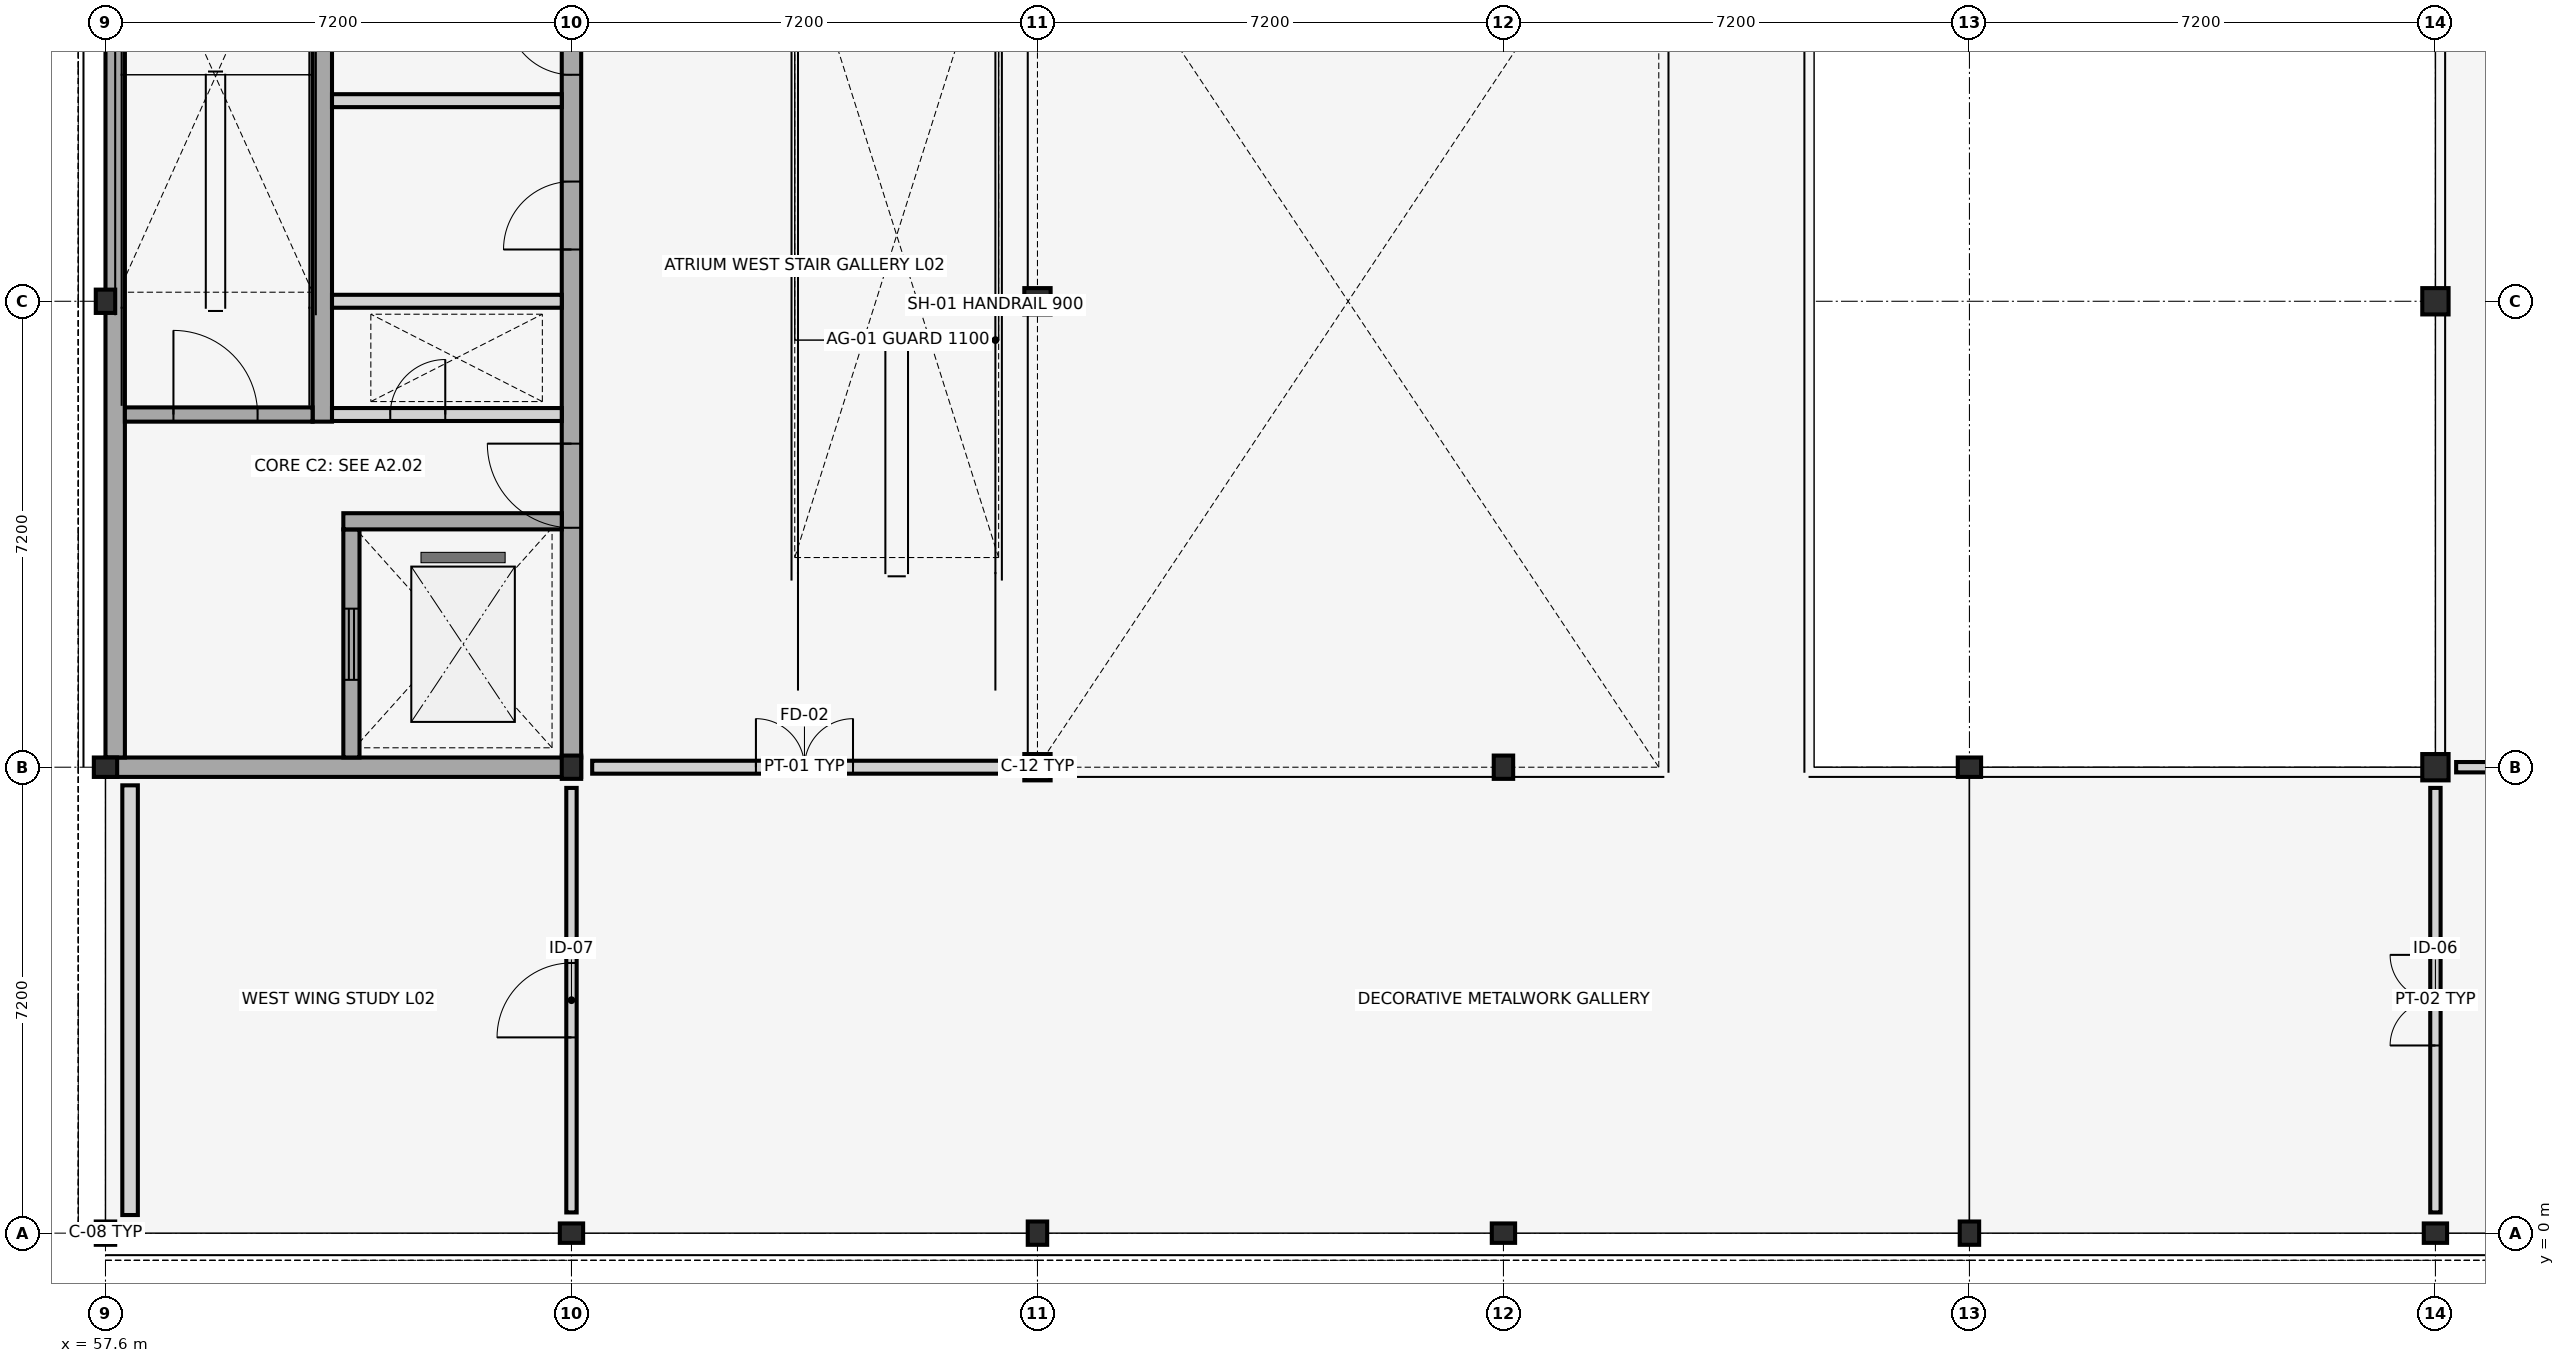
"""IFC4 building model, lengths in metres.
Left out: names, types, materials, properties, quantities, classifications, styles, units other than length and angle.
Written with IfcOpenShell. Run it as: python <this file> out.ifc"""

import sys

from ifc_helpers import new_model, si_unit, direction, frame, frame_2d, origin, origin_2d, place, context, subcontext, project, spatial, rectangle, hollow_circle, i_section, extrude, element, fill, save


model = new_model("IFC4")
c1 = context("Model", 3, precision=1e-05, world=origin(), true_north=direction((0.0, 1.0)))
c2 = subcontext(c1, "Body", "Model", "MODEL_VIEW")
j1 = project(units=[si_unit("LENGTHUNIT", "METRE"), si_unit("PLANEANGLEUNIT", "RADIAN")], contexts=[c1])
p1 = place(None, origin())
s1 = spatial("IfcSite", under=j1, at=p1, CompositionType="ELEMENT")
p2 = place(p1, origin())
s2 = spatial("IfcBuilding", under=s1, at=p2, CompositionType="ELEMENT")
p3 = place(p2, frame((0.0, 0.0, 8.7)))
s3 = spatial("IfcBuildingStorey", under=s2, at=p3, CompositionType="ELEMENT", Elevation=8.7)
for number, where, z_axis, x_axis in (
    (1, (57.6, 0.0, 0.0), (0.0, 0.0, 1.0), (1.0, 0.0, 0.0)),
    (2, (57.6, 7.2, 0.0), (0.0, 0.0, 1.0), (0.0, 1.0, 0.0)),
    (3, (57.6, 14.4, 0.0), (0.0, 0.0, 1.0), (1.0, 0.0, 0.0)),
    (4, (64.8, 0.0, 0.0), (0.0, 0.0, 1.0), (0.0, 1.0, 0.0)),
    (5, (64.8, 7.2, 0.0), (0.0, 0.0, 1.0), (1.0, 0.0, 0.0)),
    (6, (72.0, 0.0, 0.0), (0.0, 0.0, 1.0), (1.0, 0.0, 0.0)),
):
    element("IfcColumn", number, at=place(p3, frame(where, z_axis=z_axis, x_axis=x_axis)), inside=s3, PredefinedType="COLUMN", context=c2, shape_type="SweptSolid", body=[
        extrude(i_section(OverallWidth=0.3, OverallDepth=0.36, WebThickness=0.012, FlangeThickness=0.022, FilletRadius=0.027, at=origin_2d()), origin(), (0.0, 0.0, 1.0), 4.2),
    ])
for number, where, z_axis, x_axis in (
    (7, (72.0, 7.2, 0.0), (0.0, 0.0, 1.0), (0.0, 1.0, 0.0)),
    (8, (72.0, 14.4, 0.0), (0.0, 0.0, 1.0), (1.0, 0.0, 0.0)),
):
    element("IfcColumn", number, at=place(p3, frame(where, z_axis=z_axis, x_axis=x_axis)), inside=s3, PredefinedType="COLUMN", context=c2, shape_type="SweptSolid", body=[
        extrude(hollow_circle(Radius=0.203, WallThickness=0.016, at=origin_2d()), origin(), (0.0, 0.0, 1.0), 4.2),
    ])
for number, where, z_axis, x_axis in (
    (9, (79.2, 0.0, 0.0), (0.0, 0.0, 1.0), (0.0, 1.0, 0.0)),
    (10, (79.2, 7.2, 0.0), (0.0, 0.0, 1.0), (1.0, 0.0, 0.0)),
    (11, (86.4, 0.0, 0.0), (0.0, 0.0, 1.0), (1.0, 0.0, 0.0)),
    (12, (86.4, 7.2, 0.0), (0.0, 0.0, 1.0), (0.0, 1.0, 0.0)),
    (13, (93.6, 0.0, 0.0), (0.0, 0.0, 1.0), (0.0, 1.0, 0.0)),
):
    element("IfcColumn", number, at=place(p3, frame(where, z_axis=z_axis, x_axis=x_axis)), inside=s3, PredefinedType="COLUMN", context=c2, shape_type="SweptSolid", body=[
        extrude(i_section(OverallWidth=0.3, OverallDepth=0.36, WebThickness=0.012, FlangeThickness=0.022, FilletRadius=0.027, at=origin_2d()), origin(), (0.0, 0.0, 1.0), 4.2),
    ])
for number, where, z_axis, x_axis in (
    (14, (93.6, 7.2, 0.0), (0.0, 0.0, 1.0), (1.0, 0.0, 0.0)),
    (15, (93.6, 14.4, 0.0), (0.0, 0.0, 1.0), (0.0, 1.0, 0.0)),
):
    element("IfcColumn", number, at=place(p3, frame(where, z_axis=z_axis, x_axis=x_axis)), inside=s3, PredefinedType="COLUMN", context=c2, shape_type="SweptSolid", body=[
        extrude(hollow_circle(Radius=0.203, WallThickness=0.016, at=origin_2d()), origin(), (0.0, 0.0, 1.0), 4.2),
    ])
p4 = place(p3, frame((57.98, 6.92, 0.0), z_axis=(0.0, 0.0, 1.0), x_axis=(0.0, -1.0, 0.0)))
e16 = element("IfcWall", 16, at=p4, inside=s3, PredefinedType="STANDARD", context=c2, shape_type="SweptSolid", body=[
    extrude(rectangle(XDim=6.64, YDim=0.24, at=frame_2d((3.32, 0.0))), origin(), (0.0, 0.0, 1.0), 3.56),
])
p5 = place(p3, frame((57.6, 7.2, 0.0), z_axis=(0.0, 0.0, 1.0), x_axis=(1.0, 0.0, 0.0)))
e17 = element("IfcWall", 17, at=p5, inside=s3, PredefinedType="SHEAR", context=c2, shape_type="SweptSolid", body=[
    extrude(rectangle(XDim=7.35, YDim=0.3, at=frame_2d((3.675, 0.0))), origin(), (0.0, 0.0, 1.0), 3.96),
])
p6 = place(p3, frame((57.75, 7.35, 0.0), z_axis=(0.0, 0.0, 1.0), x_axis=(0.0, 1.0, 0.0)))
e18 = element("IfcWall", 18, at=p6, inside=s3, PredefinedType="SHEAR", context=c2, shape_type="SweptSolid", body=[
    extrude(rectangle(XDim=14.1, YDim=0.3, at=frame_2d((7.05, 0.0))), origin(), (0.0, 0.0, 1.0), 3.96),
])
p7 = place(p3, frame((64.8, 7.35, 0.0), z_axis=(0.0, 0.0, 1.0), x_axis=(0.0, 1.0, 0.0)))
e19 = element("IfcWall", 19, at=p7, inside=s3, PredefinedType="SHEAR", context=c2, shape_type="SweptSolid", body=[
    extrude(rectangle(XDim=14.1, YDim=0.3, at=frame_2d((7.05, 0.0))), origin(), (0.0, 0.0, 1.0), 3.96),
])
p8 = place(p7, frame((3.55, 0.0, 0.0)))
e20 = element("IfcOpeningElement", 20, at=p8, cuts=e19, PredefinedType="OPENING", context=c2, shape_type="SweptSolid", body=[
    extrude(rectangle(XDim=1.3, YDim=2.2, at=frame_2d((0.65, 1.1))), frame((0.0, 0.16, 0.0), z_axis=(0.0, -1.0, 0.0), x_axis=(1.0, 0.0, 0.0)), (0.0, 0.0, 1.0), 0.32),
])
p9 = place(p7, frame((7.85, 0.0, 0.0)))
e21 = element("IfcOpeningElement", 21, at=p9, cuts=e19, PredefinedType="OPENING", context=c2, shape_type="SweptSolid", body=[
    extrude(rectangle(XDim=1.05, YDim=2.15, at=frame_2d((0.525, 1.075))), frame((0.0, 0.16, 0.0), z_axis=(0.0, -1.0, 0.0), x_axis=(1.0, 0.0, 0.0)), (0.0, 0.0, 1.0), 0.32),
])
p10 = place(p7, frame((10.55, 0.0, 0.0)))
e22 = element("IfcOpeningElement", 22, at=p10, cuts=e19, PredefinedType="OPENING", context=c2, shape_type="SweptSolid", body=[
    extrude(rectangle(XDim=1.0, YDim=2.15, at=frame_2d((0.5, 1.075))), frame((0.0, 0.16, 0.0), z_axis=(0.0, -1.0, 0.0), x_axis=(1.0, 0.0, 0.0)), (0.0, 0.0, 1.0), 0.32),
])
p11 = place(p3, frame((61.4, 7.35, 0.0), z_axis=(0.0, 0.0, 1.0), x_axis=(0.0, 1.0, 0.0)))
e23 = element("IfcWall", 23, at=p11, inside=s3, PredefinedType="SHEAR", context=c2, shape_type="SweptSolid", body=[
    extrude(rectangle(XDim=3.525, YDim=0.25, at=frame_2d((1.762, 0.0))), origin(), (0.0, 0.0, 1.0), 3.96),
])
p12 = place(p11, frame((1.2, 0.0, 0.0)))
e24 = element("IfcOpeningElement", 24, at=p12, cuts=e23, PredefinedType="OPENING", context=c2, shape_type="SweptSolid", body=[
    extrude(rectangle(XDim=1.1, YDim=2.15, at=frame_2d((0.55, 1.075))), frame((0.0, 0.135, 0.0), z_axis=(0.0, -1.0, 0.0), x_axis=(1.0, 0.0, 0.0)), (0.0, 0.0, 1.0), 0.27),
])
p13 = place(p3, frame((60.95, 12.54, 0.0), z_axis=(0.0, 0.0, 1.0), x_axis=(0.0, 1.0, 0.0)))
e25 = element("IfcWall", 25, at=p13, inside=s3, PredefinedType="SHEAR", context=c2, shape_type="SweptSolid", body=[
    extrude(rectangle(XDim=8.91, YDim=0.3, at=frame_2d((4.455, 0.0))), origin(), (0.0, 0.0, 1.0), 3.96),
])
p14 = place(p3, frame((61.1, 12.65, 0.0), z_axis=(0.0, 0.0, 1.0), x_axis=(1.0, 0.0, 0.0)))
e26 = element("IfcWall", 26, at=p14, inside=s3, PredefinedType="PLUMBINGWALL", context=c2, shape_type="SweptSolid", body=[
    extrude(rectangle(XDim=3.55, YDim=0.2, at=frame_2d((1.775, 0.0))), origin(), (0.0, 0.0, 1.0), 3.38),
])
p15 = place(p14, frame((0.9, 0.0, 0.0)))
e27 = element("IfcOpeningElement", 27, at=p15, cuts=e26, PredefinedType="OPENING", context=c2, shape_type="SweptSolid", body=[
    extrude(rectangle(XDim=0.85, YDim=2.05, at=frame_2d((0.425, 1.025))), frame((0.0, 0.11, 0.0), z_axis=(0.0, -1.0, 0.0), x_axis=(1.0, 0.0, 0.0)), (0.0, 0.0, 1.0), 0.22),
])
p16 = place(p3, frame((57.9, 12.65, 0.0), z_axis=(0.0, 0.0, 1.0), x_axis=(1.0, 0.0, 0.0)))
e28 = element("IfcWall", 28, at=p16, inside=s3, PredefinedType="SHEAR", context=c2, shape_type="SweptSolid", body=[
    extrude(rectangle(XDim=2.9, YDim=0.22, at=frame_2d((1.45, 0.0))), origin(), (0.0, 0.0, 1.0), 3.96),
])
p17 = place(p16, frame((0.75, 0.0, 0.0)))
e29 = element("IfcOpeningElement", 29, at=p17, cuts=e28, PredefinedType="OPENING", context=c2, shape_type="SweptSolid", body=[
    extrude(rectangle(XDim=1.3, YDim=2.2, at=frame_2d((0.65, 1.1))), frame((0.0, 0.12, 0.0), z_axis=(0.0, -1.0, 0.0), x_axis=(1.0, 0.0, 0.0)), (0.0, 0.0, 1.0), 0.24),
])
p18 = place(p3, frame((61.275, 11.0, 0.0), z_axis=(0.0, 0.0, 1.0), x_axis=(1.0, 0.0, 0.0)))
e30 = element("IfcWall", 30, at=p18, inside=s3, PredefinedType="SHEAR", context=c2, shape_type="SweptSolid", body=[
    extrude(rectangle(XDim=3.375, YDim=0.25, at=frame_2d((1.688, 0.0))), origin(), (0.0, 0.0, 1.0), 3.96),
])
for number, where, z_axis, x_axis in (
    (31, (61.1, 14.4, 0.0), (0.0, 0.0, 1.0), (1.0, 0.0, 0.0)),
    (32, (61.1, 17.5, 0.0), (0.0, 0.0, 1.0), (1.0, 0.0, 0.0)),
):
    element("IfcWall", number, at=place(p3, frame(where, z_axis=z_axis, x_axis=x_axis)), inside=s3, PredefinedType="PLUMBINGWALL", context=c2, shape_type="SweptSolid", body=[
        extrude(rectangle(XDim=3.55, YDim=0.2, at=frame_2d((1.775, 0.0))), origin(), (0.0, 0.0, 1.0), 3.38),
    ])
p19 = place(p3, frame((65.12, 7.2, 0.0), z_axis=(0.0, 0.0, 1.0), x_axis=(1.0, 0.0, 0.0)))
e33 = element("IfcWall", 33, at=p19, inside=s3, PredefinedType="PARTITIONING", context=c2, shape_type="SweptSolid", body=[
    extrude(rectangle(XDim=6.56, YDim=0.2, at=frame_2d((3.28, 0.0))), origin(), (0.0, 0.0, 1.0), 3.15),
])
p20 = place(p19, frame((2.53, 0.0, 0.0)))
e34 = element("IfcOpeningElement", 34, at=p20, cuts=e33, PredefinedType="OPENING", context=c2, shape_type="SweptSolid", body=[
    extrude(rectangle(XDim=1.5, YDim=2.25, at=frame_2d((0.75, 1.125))), frame((0.0, 0.11, 0.0), z_axis=(0.0, -1.0, 0.0), x_axis=(1.0, 0.0, 0.0)), (0.0, 0.0, 1.0), 0.22),
])
p21 = place(p3, frame((93.6, 0.32, 0.0), z_axis=(0.0, 0.0, 1.0), x_axis=(0.0, 1.0, 0.0)))
e35 = element("IfcWall", 35, at=p21, inside=s3, PredefinedType="PARTITIONING", context=c2, shape_type="SweptSolid", body=[
    extrude(rectangle(XDim=6.56, YDim=0.16, at=frame_2d((3.28, 0.0))), origin(), (0.0, 0.0, 1.0), 3.15),
])
p22 = place(p21, frame((2.58, 0.0, 0.0)))
e36 = element("IfcOpeningElement", 36, at=p22, cuts=e35, PredefinedType="OPENING", context=c2, shape_type="SweptSolid", body=[
    extrude(rectangle(XDim=1.4, YDim=2.3, at=frame_2d((0.7, 1.15))), frame((0.0, 0.09, 0.0), z_axis=(0.0, -1.0, 0.0), x_axis=(1.0, 0.0, 0.0)), (0.0, 0.0, 1.0), 0.18),
])
p23 = place(p3, frame((64.8, 0.32, 0.0), z_axis=(0.0, 0.0, 1.0), x_axis=(0.0, 1.0, 0.0)))
e37 = element("IfcWall", 37, at=p23, inside=s3, PredefinedType="PARTITIONING", context=c2, shape_type="SweptSolid", body=[
    extrude(rectangle(XDim=6.56, YDim=0.16, at=frame_2d((3.28, 0.0))), origin(), (0.0, 0.0, 1.0), 3.15),
])
p24 = place(p23, frame((2.705, 0.0, 0.0)))
e38 = element("IfcOpeningElement", 38, at=p24, cuts=e37, PredefinedType="OPENING", context=c2, shape_type="SweptSolid", body=[
    extrude(rectangle(XDim=1.15, YDim=2.2, at=frame_2d((0.575, 1.1))), frame((0.0, 0.09, 0.0), z_axis=(0.0, -1.0, 0.0), x_axis=(1.0, 0.0, 0.0)), (0.0, 0.0, 1.0), 0.18),
])
p25 = place(p3, frame((93.92, 7.2, 0.0), z_axis=(0.0, 0.0, 1.0), x_axis=(1.0, 0.0, 0.0)))
e39 = element("IfcWall", 39, at=p25, inside=s3, PredefinedType="PARTITIONING", context=c2, shape_type="SweptSolid", body=[
    extrude(rectangle(XDim=6.56, YDim=0.16, at=frame_2d((3.28, 0.0))), origin(), (0.0, 0.0, 1.0), 3.15),
])
p26 = place(p25, frame((2.655, 0.0, 0.0)))
e40 = element("IfcOpeningElement", 40, at=p26, cuts=e39, PredefinedType="OPENING", context=c2, shape_type="SweptSolid", body=[
    extrude(rectangle(XDim=1.25, YDim=2.3, at=frame_2d((0.625, 1.15))), frame((0.0, 0.09, 0.0), z_axis=(0.0, -1.0, 0.0), x_axis=(1.0, 0.0, 0.0)), (0.0, 0.0, 1.0), 0.18),
])
p27 = place(p8, origin())
e41 = element("IfcDoor", 41, at=p27, inside=s3, OperationType="SINGLE_SWING_RIGHT", PredefinedType="DOOR", context=c2, shape_type="SweptSolid", body=[
    extrude(rectangle(XDim=1.3, YDim=2.2, at=frame_2d((0.65, 1.1))), frame((0.0, 0.025, 0.0), z_axis=(0.0, -1.0, 0.0), x_axis=(1.0, 0.0, 0.0)), (0.0, 0.0, 1.0), 0.05),
])
fill(e20, e41)
p28 = place(p9, origin())
e42 = element("IfcDoor", 42, at=p28, inside=s3, OperationType="SINGLE_SWING_LEFT", PredefinedType="DOOR", context=c2, shape_type="SweptSolid", body=[
    extrude(rectangle(XDim=1.05, YDim=2.15, at=frame_2d((0.525, 1.075))), frame((0.0, 0.025, 0.0), z_axis=(0.0, -1.0, 0.0), x_axis=(1.0, 0.0, 0.0)), (0.0, 0.0, 1.0), 0.05),
])
fill(e21, e42)
p29 = place(p10, origin())
e43 = element("IfcDoor", 43, at=p29, inside=s3, OperationType="SINGLE_SWING_RIGHT", PredefinedType="DOOR", context=c2, shape_type="SweptSolid", body=[
    extrude(rectangle(XDim=1.0, YDim=2.15, at=frame_2d((0.5, 1.075))), frame((0.0, 0.025, 0.0), z_axis=(0.0, -1.0, 0.0), x_axis=(1.0, 0.0, 0.0)), (0.0, 0.0, 1.0), 0.05),
])
fill(e22, e43)
p30 = place(p12, origin())
e44 = element("IfcDoor", 44, at=p30, inside=s3, OperationType="SLIDING_TO_LEFT", PredefinedType="DOOR", context=c2, shape_type="SweptSolid", body=[
    extrude(rectangle(XDim=1.1, YDim=2.15, at=frame_2d((0.55, 1.075))), frame((0.0, 0.025, 0.0), z_axis=(0.0, -1.0, 0.0), x_axis=(1.0, 0.0, 0.0)), (0.0, 0.0, 1.0), 0.05),
])
fill(e24, e44)
p31 = place(p15, origin())
e45 = element("IfcDoor", 45, at=p31, inside=s3, OperationType="SINGLE_SWING_RIGHT", PredefinedType="TRAPDOOR", context=c2, shape_type="SweptSolid", body=[
    extrude(rectangle(XDim=0.85, YDim=2.05, at=frame_2d((0.425, 1.025))), frame((0.0, 0.025, 0.0), z_axis=(0.0, -1.0, 0.0), x_axis=(1.0, 0.0, 0.0)), (0.0, 0.0, 1.0), 0.05),
])
fill(e27, e45)
p32 = place(p17, origin())
e46 = element("IfcDoor", 46, at=p32, inside=s3, OperationType="SINGLE_SWING_LEFT", PredefinedType="DOOR", context=c2, shape_type="SweptSolid", body=[
    extrude(rectangle(XDim=1.3, YDim=2.2, at=frame_2d((0.65, 1.1))), frame((0.0, 0.025, 0.0), z_axis=(0.0, -1.0, 0.0), x_axis=(1.0, 0.0, 0.0)), (0.0, 0.0, 1.0), 0.05),
])
fill(e29, e46)
p33 = place(p20, origin())
e47 = element("IfcDoor", 47, at=p33, inside=s3, OperationType="DOUBLE_DOOR_SINGLE_SWING", PredefinedType="DOOR", context=c2, shape_type="SweptSolid", body=[
    extrude(rectangle(XDim=1.5, YDim=2.25, at=frame_2d((0.75, 1.125))), frame((0.0, 0.025, 0.0), z_axis=(0.0, -1.0, 0.0), x_axis=(1.0, 0.0, 0.0)), (0.0, 0.0, 1.0), 0.05),
])
fill(e34, e47)
p34 = place(p22, origin())
e48 = element("IfcDoor", 48, at=p34, inside=s3, OperationType="DOUBLE_DOOR_SINGLE_SWING", PredefinedType="DOOR", context=c2, shape_type="SweptSolid", body=[
    extrude(rectangle(XDim=1.4, YDim=2.3, at=frame_2d((0.7, 1.15))), frame((0.0, 0.025, 0.0), z_axis=(0.0, -1.0, 0.0), x_axis=(1.0, 0.0, 0.0)), (0.0, 0.0, 1.0), 0.05),
])
fill(e36, e48)
p35 = place(p24, origin())
e49 = element("IfcDoor", 49, at=p35, inside=s3, OperationType="SINGLE_SWING_LEFT", PredefinedType="DOOR", context=c2, shape_type="SweptSolid", body=[
    extrude(rectangle(XDim=1.15, YDim=2.2, at=frame_2d((0.575, 1.1))), frame((0.0, 0.025, 0.0), z_axis=(0.0, -1.0, 0.0), x_axis=(1.0, 0.0, 0.0)), (0.0, 0.0, 1.0), 0.05),
])
fill(e38, e49)
save(model, sys.argv[1])
